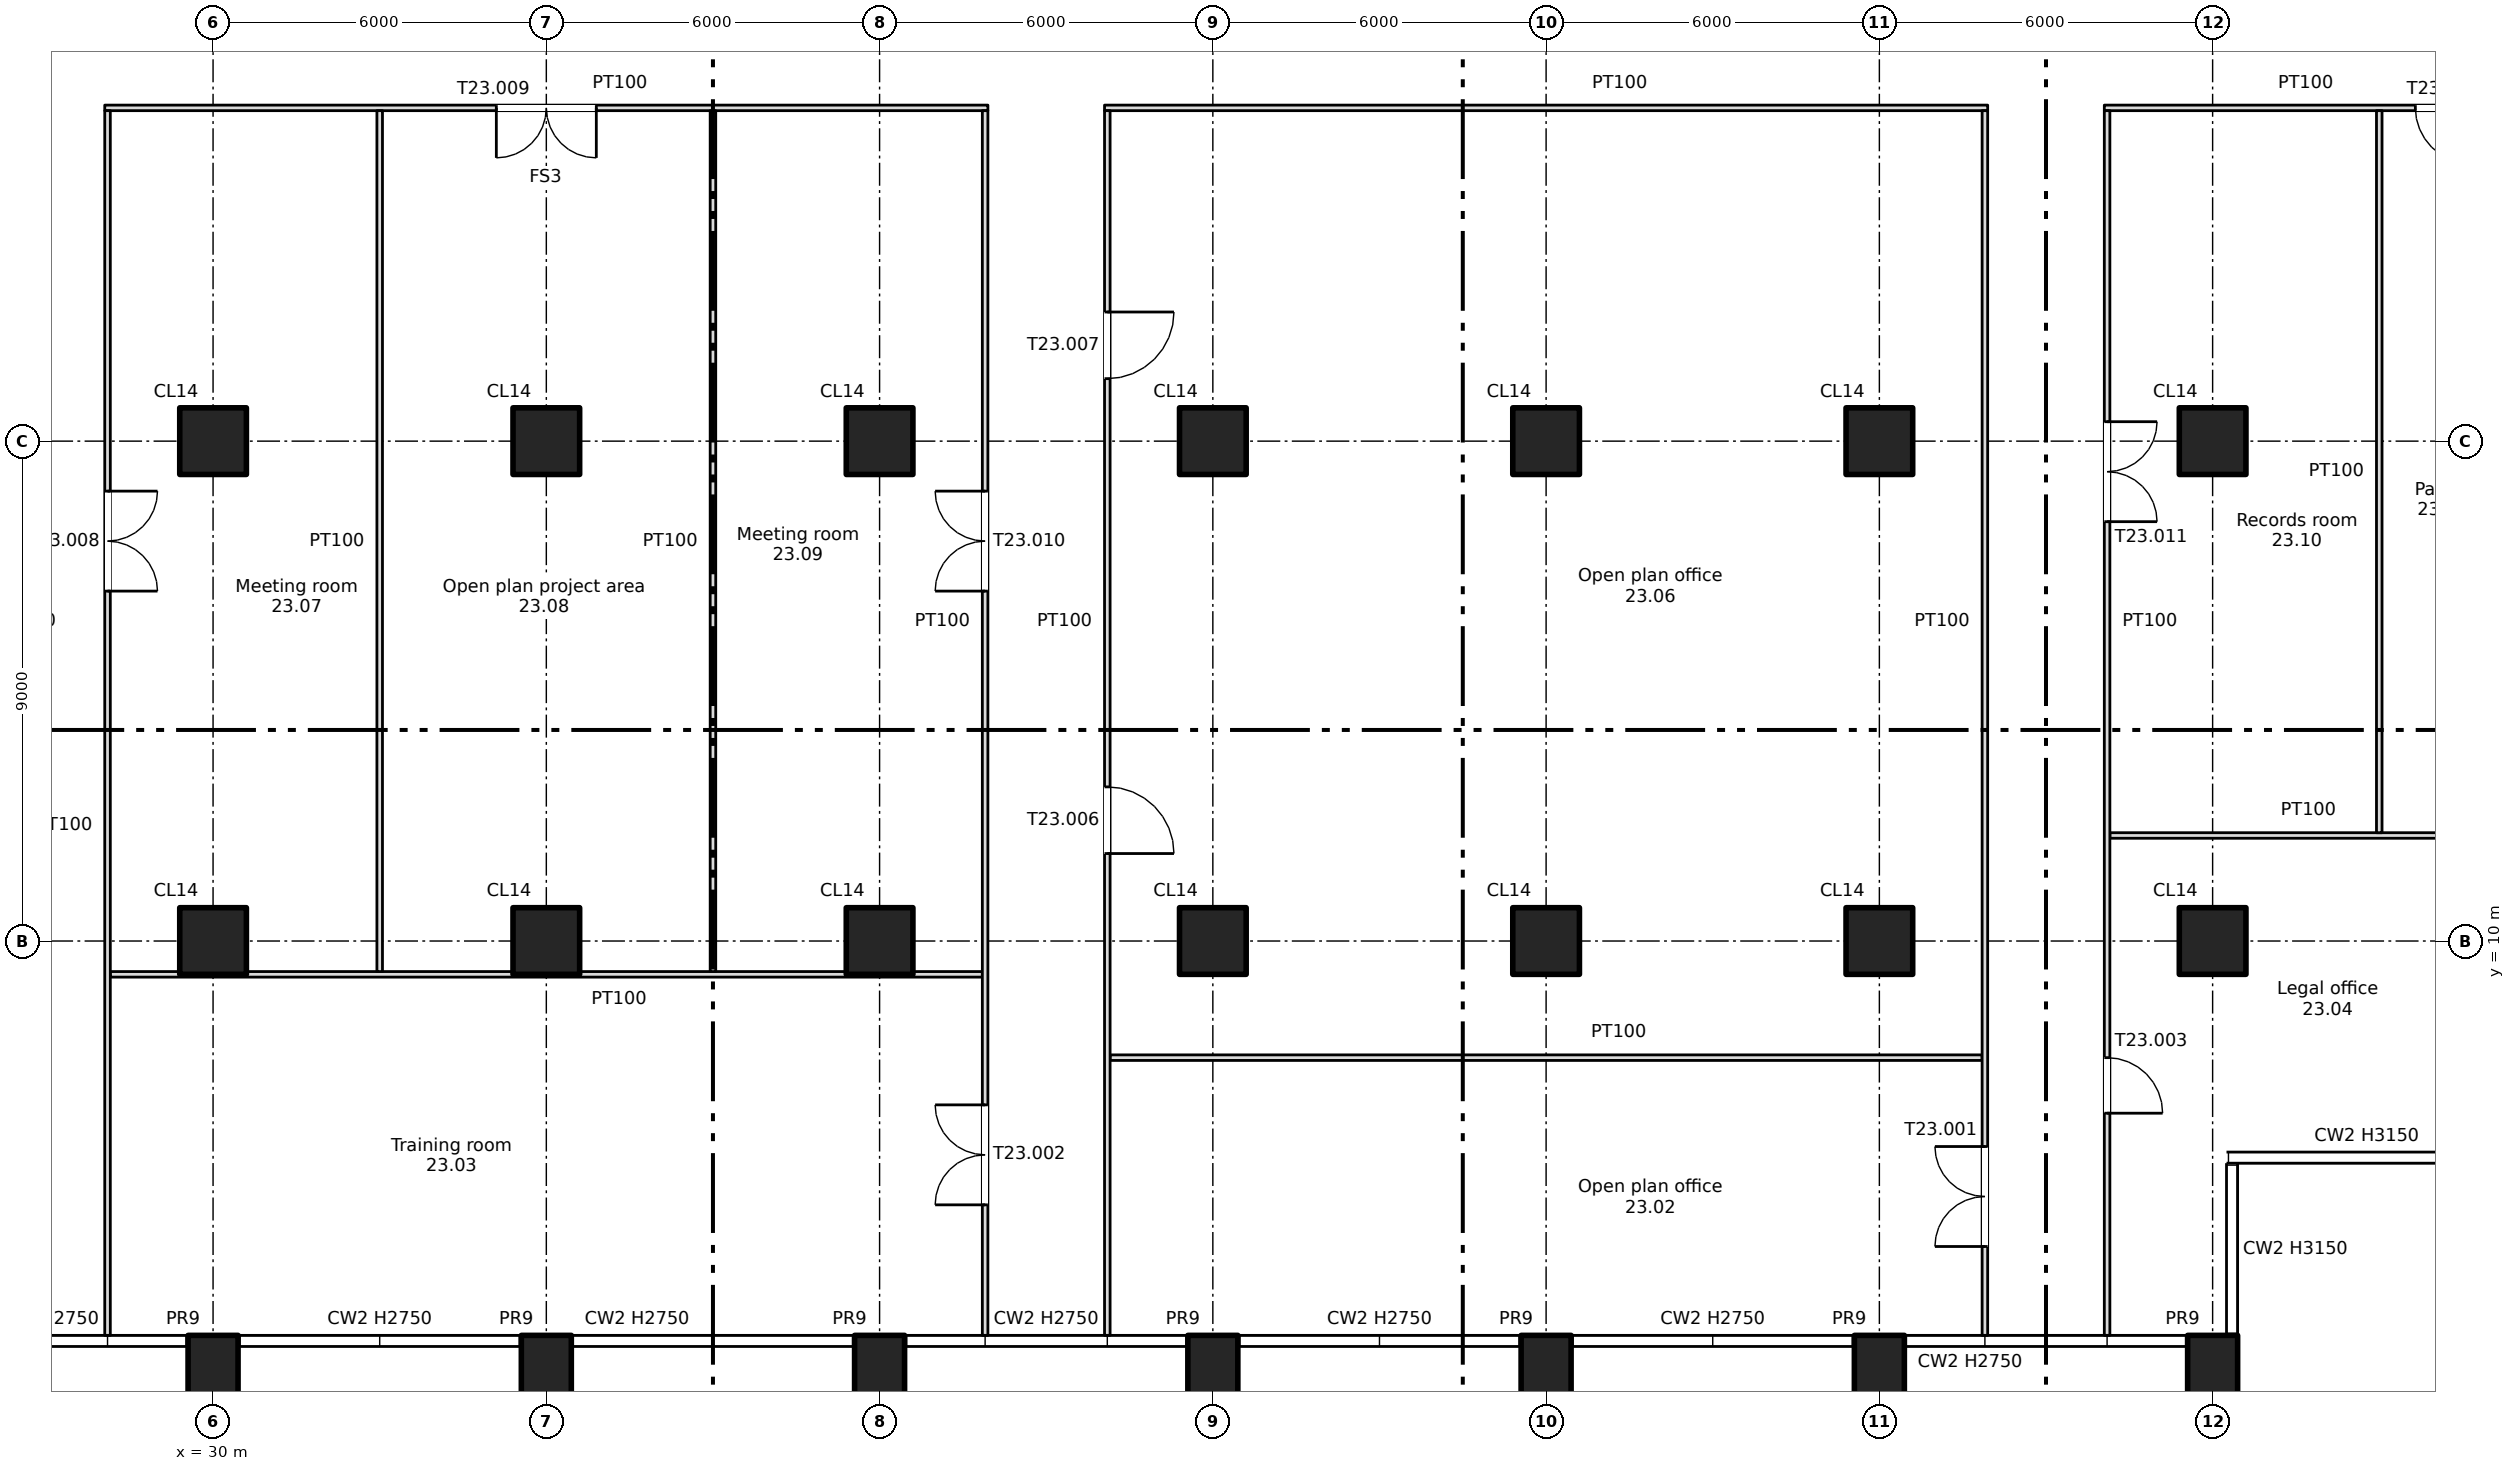
"""IFC4 building model, lengths in metres.
Left out: names, types, materials, properties, quantities, classifications, styles, units other than length and angle.
Written with IfcOpenShell. Run it as: python <this file> out.ifc"""

import sys

from ifc_helpers import new_model, si_unit, direction, frame, frame_2d, origin, origin_2d, place, context, subcontext, project, spatial, rectangle, extrude, element, fill, save


model = new_model("IFC4")
c1 = context("Model", 3, precision=1e-05, world=origin(), true_north=direction((0.0, 1.0)))
c2 = subcontext(c1, "Body", "Model", "MODEL_VIEW")
j1 = project(units=[si_unit("LENGTHUNIT", "METRE"), si_unit("PLANEANGLEUNIT", "RADIAN")], contexts=[c1])
p1 = place(None, origin())
s1 = spatial("IfcSite", under=j1, at=p1, CompositionType="ELEMENT")
p2 = place(p1, origin())
s2 = spatial("IfcBuilding", under=s1, at=p2, CompositionType="ELEMENT")
p3 = place(p2, frame((0.0, 0.0, 155.0)))
s3 = spatial("IfcBuildingStorey", under=s2, at=p3, CompositionType="ELEMENT", Elevation=155.0)
for number, where, z_axis, x_axis in (
    (1, (30.0, 2.2, -0.4), (0.0, 0.0, 1.0), (1.0, 0.0, 0.0)),
    (2, (36.0, 2.2, -0.4), (0.0, 0.0, 1.0), (1.0, 0.0, 0.0)),
    (3, (42.0, 2.2, -0.4), (0.0, 0.0, 1.0), (1.0, 0.0, 0.0)),
    (4, (48.0, 2.2, -0.4), (0.0, 0.0, 1.0), (1.0, 0.0, 0.0)),
    (5, (54.0, 2.2, -0.4), (0.0, 0.0, 1.0), (1.0, 0.0, 0.0)),
    (6, (60.0, 2.2, -0.4), (0.0, 0.0, 1.0), (1.0, 0.0, 0.0)),
    (7, (66.0, 2.2, -0.4), (0.0, 0.0, 1.0), (1.0, 0.0, 0.0)),
):
    element("IfcColumn", number, at=place(p3, frame(where, z_axis=z_axis, x_axis=x_axis)), inside=s3, PredefinedType="COLUMN", context=c2, shape_type="SweptSolid", body=[
        extrude(rectangle(XDim=0.9, YDim=1.4, at=origin_2d()), origin(), (0.0, 0.0, 1.0), 3.55),
    ])
for number, where, z_axis, x_axis in (
    (8, (30.0, 10.0, 0.0), (0.0, 0.0, 1.0), (1.0, 0.0, 0.0)),
    (9, (30.0, 19.0, 0.0), (0.0, 0.0, 1.0), (1.0, 0.0, 0.0)),
    (10, (36.0, 10.0, 0.0), (0.0, 0.0, 1.0), (1.0, 0.0, 0.0)),
    (11, (36.0, 19.0, 0.0), (0.0, 0.0, 1.0), (1.0, 0.0, 0.0)),
    (12, (42.0, 10.0, 0.0), (0.0, 0.0, 1.0), (1.0, 0.0, 0.0)),
    (13, (42.0, 19.0, 0.0), (0.0, 0.0, 1.0), (1.0, 0.0, 0.0)),
    (14, (48.0, 10.0, 0.0), (0.0, 0.0, 1.0), (1.0, 0.0, 0.0)),
    (15, (48.0, 19.0, 0.0), (0.0, 0.0, 1.0), (1.0, 0.0, 0.0)),
    (16, (54.0, 10.0, 0.0), (0.0, 0.0, 1.0), (1.0, 0.0, 0.0)),
    (17, (54.0, 19.0, 0.0), (0.0, 0.0, 1.0), (1.0, 0.0, 0.0)),
    (18, (60.0, 10.0, 0.0), (0.0, 0.0, 1.0), (1.0, 0.0, 0.0)),
    (19, (60.0, 19.0, 0.0), (0.0, 0.0, 1.0), (1.0, 0.0, 0.0)),
    (20, (66.0, 10.0, 0.0), (0.0, 0.0, 1.0), (1.0, 0.0, 0.0)),
    (21, (66.0, 19.0, 0.0), (0.0, 0.0, 1.0), (1.0, 0.0, 0.0)),
):
    element("IfcColumn", number, at=place(p3, frame(where, z_axis=z_axis, x_axis=x_axis)), inside=s3, PredefinedType="COLUMN", context=c2, shape_type="SweptSolid", body=[
        extrude(rectangle(XDim=1.2, YDim=1.2, at=origin_2d()), origin(), (0.0, 0.0, 1.0), 3.15),
    ])
for number, where, z_axis, x_axis in (
    (22, (46.15, 7.9, 0.0), (0.0, 0.0, 1.0), (1.0, 0.0, 0.0)),
    (23, (28.15, 9.4, 0.0), (0.0, 0.0, 1.0), (1.0, 0.0, 0.0)),
):
    element("IfcWall", number, at=place(p3, frame(where, z_axis=z_axis, x_axis=x_axis)), inside=s3, PredefinedType="PARTITIONING", context=c2, shape_type="SweptSolid", body=[
        extrude(rectangle(XDim=15.7, YDim=0.1, at=frame_2d((7.85, 0.0))), origin(), (0.0, 0.0, 1.0), 3.15),
    ])
p4 = place(p3, frame((64.15, 11.9, 0.0), z_axis=(0.0, 0.0, 1.0), x_axis=(1.0, 0.0, 0.0)))
e24 = element("IfcWall", 24, at=p4, inside=s3, PredefinedType="PARTITIONING", context=c2, shape_type="SweptSolid", body=[
    extrude(rectangle(XDim=7.15, YDim=0.1, at=frame_2d((3.575, 0.0))), origin(), (0.0, 0.0, 1.0), 3.15),
])
p5 = place(p3, frame((28.05, 25.0, 0.0), z_axis=(0.0, 0.0, 1.0), x_axis=(1.0, 0.0, 0.0)))
e25 = element("IfcWall", 25, at=p5, inside=s3, PredefinedType="PARTITIONING", context=c2, shape_type="SweptSolid", body=[
    extrude(rectangle(XDim=15.9, YDim=0.1, at=frame_2d((7.95, 0.0))), origin(), (0.0, 0.0, 1.0), 3.15),
])
p6 = place(p5, frame((7.05, 0.0, 0.0)))
e26 = element("IfcOpeningElement", 26, at=p6, cuts=e25, PredefinedType="OPENING", context=c2, shape_type="SweptSolid", body=[
    extrude(rectangle(XDim=1.8, YDim=2.1, at=frame_2d((0.9, 1.05))), frame((0.0, 0.06, 0.0), z_axis=(0.0, -1.0, 0.0), x_axis=(1.0, 0.0, 0.0)), (0.0, 0.0, 1.0), 0.12),
])
p7 = place(p3, frame((46.05, 25.0, 0.0), z_axis=(0.0, 0.0, 1.0), x_axis=(1.0, 0.0, 0.0)))
e27 = element("IfcWall", 27, at=p7, inside=s3, PredefinedType="PARTITIONING", context=c2, shape_type="SweptSolid", body=[
    extrude(rectangle(XDim=15.9, YDim=0.1, at=frame_2d((7.95, 0.0))), origin(), (0.0, 0.0, 1.0), 3.15),
])
p8 = place(p3, frame((64.05, 25.0, 0.0), z_axis=(0.0, 0.0, 1.0), x_axis=(1.0, 0.0, 0.0)))
e28 = element("IfcWall", 28, at=p8, inside=s3, PredefinedType="PARTITIONING", context=c2, shape_type="SweptSolid", body=[
    extrude(rectangle(XDim=7.25, YDim=0.1, at=frame_2d((3.625, 0.0))), origin(), (0.0, 0.0, 1.0), 3.15),
])
p9 = place(p8, frame((5.6, 0.0, 0.0)))
e29 = element("IfcOpeningElement", 29, at=p9, cuts=e28, PredefinedType="OPENING", context=c2, shape_type="SweptSolid", body=[
    extrude(rectangle(XDim=1.0, YDim=2.1, at=frame_2d((0.5, 1.05))), frame((0.0, 0.06, 0.0), z_axis=(0.0, -1.0, 0.0), x_axis=(1.0, 0.0, 0.0)), (0.0, 0.0, 1.0), 0.12),
])
p10 = place(p3, frame((28.1, 2.9, 0.0), z_axis=(0.0, 0.0, 1.0), x_axis=(0.0, 1.0, 0.0)))
e30 = element("IfcWall", 30, at=p10, inside=s3, PredefinedType="PARTITIONING", context=c2, shape_type="SweptSolid", body=[
    extrude(rectangle(XDim=22.05, YDim=0.1, at=frame_2d((11.025, 0.0))), origin(), (0.0, 0.0, 1.0), 3.15),
])
p11 = place(p10, frame((13.4, 0.0, 0.0)))
e31 = element("IfcOpeningElement", 31, at=p11, cuts=e30, PredefinedType="OPENING", context=c2, shape_type="SweptSolid", body=[
    extrude(rectangle(XDim=1.8, YDim=2.1, at=frame_2d((0.9, 1.05))), frame((0.0, 0.06, 0.0), z_axis=(0.0, -1.0, 0.0), x_axis=(1.0, 0.0, 0.0)), (0.0, 0.0, 1.0), 0.12),
])
for number, where, z_axis, x_axis in (
    (32, (33.0, 9.45, 0.0), (0.0, 0.0, 1.0), (0.0, 1.0, 0.0)),
    (33, (39.0, 9.45, 0.0), (0.0, 0.0, 1.0), (0.0, 1.0, 0.0)),
):
    element("IfcWall", number, at=place(p3, frame(where, z_axis=z_axis, x_axis=x_axis)), inside=s3, PredefinedType="PARTITIONING", context=c2, shape_type="SweptSolid", body=[
        extrude(rectangle(XDim=15.5, YDim=0.1, at=frame_2d((7.75, 0.0))), origin(), (0.0, 0.0, 1.0), 3.15),
    ])
p12 = place(p3, frame((43.9, 2.9, 0.0), z_axis=(0.0, 0.0, 1.0), x_axis=(0.0, 1.0, 0.0)))
e34 = element("IfcWall", 34, at=p12, inside=s3, PredefinedType="PARTITIONING", context=c2, shape_type="SweptSolid", body=[
    extrude(rectangle(XDim=22.05, YDim=0.1, at=frame_2d((11.025, 0.0))), origin(), (0.0, 0.0, 1.0), 3.15),
])
p13 = place(p12, frame((2.35, 0.0, 0.0)))
e35 = element("IfcOpeningElement", 35, at=p13, cuts=e34, PredefinedType="OPENING", context=c2, shape_type="SweptSolid", body=[
    extrude(rectangle(XDim=1.8, YDim=2.1, at=frame_2d((0.9, 1.05))), frame((0.0, 0.06, 0.0), z_axis=(0.0, -1.0, 0.0), x_axis=(1.0, 0.0, 0.0)), (0.0, 0.0, 1.0), 0.12),
])
p14 = place(p12, frame((13.4, 0.0, 0.0)))
e36 = element("IfcOpeningElement", 36, at=p14, cuts=e34, PredefinedType="OPENING", context=c2, shape_type="SweptSolid", body=[
    extrude(rectangle(XDim=1.8, YDim=2.1, at=frame_2d((0.9, 1.05))), frame((0.0, 0.06, 0.0), z_axis=(0.0, -1.0, 0.0), x_axis=(1.0, 0.0, 0.0)), (0.0, 0.0, 1.0), 0.12),
])
p15 = place(p3, frame((46.1, 2.9, 0.0), z_axis=(0.0, 0.0, 1.0), x_axis=(0.0, 1.0, 0.0)))
e37 = element("IfcWall", 37, at=p15, inside=s3, PredefinedType="PARTITIONING", context=c2, shape_type="SweptSolid", body=[
    extrude(rectangle(XDim=22.05, YDim=0.1, at=frame_2d((11.025, 0.0))), origin(), (0.0, 0.0, 1.0), 3.15),
])
p16 = place(p15, frame((8.675, 0.0, 0.0)))
e38 = element("IfcOpeningElement", 38, at=p16, cuts=e37, PredefinedType="OPENING", context=c2, shape_type="SweptSolid", body=[
    extrude(rectangle(XDim=1.2, YDim=2.1, at=frame_2d((0.6, 1.05))), frame((0.0, 0.06, 0.0), z_axis=(0.0, -1.0, 0.0), x_axis=(1.0, 0.0, 0.0)), (0.0, 0.0, 1.0), 0.12),
])
p17 = place(p15, frame((17.225, 0.0, 0.0)))
e39 = element("IfcOpeningElement", 39, at=p17, cuts=e37, PredefinedType="OPENING", context=c2, shape_type="SweptSolid", body=[
    extrude(rectangle(XDim=1.2, YDim=2.1, at=frame_2d((0.6, 1.05))), frame((0.0, 0.06, 0.0), z_axis=(0.0, -1.0, 0.0), x_axis=(1.0, 0.0, 0.0)), (0.0, 0.0, 1.0), 0.12),
])
p18 = place(p3, frame((61.9, 2.9, 0.0), z_axis=(0.0, 0.0, 1.0), x_axis=(0.0, 1.0, 0.0)))
e40 = element("IfcWall", 40, at=p18, inside=s3, PredefinedType="PARTITIONING", context=c2, shape_type="SweptSolid", body=[
    extrude(rectangle(XDim=22.05, YDim=0.1, at=frame_2d((11.025, 0.0))), origin(), (0.0, 0.0, 1.0), 3.15),
])
p19 = place(p18, frame((1.6, 0.0, 0.0)))
e41 = element("IfcOpeningElement", 41, at=p19, cuts=e40, PredefinedType="OPENING", context=c2, shape_type="SweptSolid", body=[
    extrude(rectangle(XDim=1.8, YDim=2.1, at=frame_2d((0.9, 1.05))), frame((0.0, 0.06, 0.0), z_axis=(0.0, -1.0, 0.0), x_axis=(1.0, 0.0, 0.0)), (0.0, 0.0, 1.0), 0.12),
])
p20 = place(p3, frame((64.1, 2.9, 0.0), z_axis=(0.0, 0.0, 1.0), x_axis=(0.0, 1.0, 0.0)))
e42 = element("IfcWall", 42, at=p20, inside=s3, PredefinedType="PARTITIONING", context=c2, shape_type="SweptSolid", body=[
    extrude(rectangle(XDim=22.05, YDim=0.1, at=frame_2d((11.025, 0.0))), origin(), (0.0, 0.0, 1.0), 3.15),
])
p21 = place(p20, frame((4.0, 0.0, 0.0)))
e43 = element("IfcOpeningElement", 43, at=p21, cuts=e42, PredefinedType="OPENING", context=c2, shape_type="SweptSolid", body=[
    extrude(rectangle(XDim=1.0, YDim=2.1, at=frame_2d((0.5, 1.05))), frame((0.0, 0.06, 0.0), z_axis=(0.0, -1.0, 0.0), x_axis=(1.0, 0.0, 0.0)), (0.0, 0.0, 1.0), 0.12),
])
p22 = place(p20, frame((14.65, 0.0, 0.0)))
e44 = element("IfcOpeningElement", 44, at=p22, cuts=e42, PredefinedType="OPENING", context=c2, shape_type="SweptSolid", body=[
    extrude(rectangle(XDim=1.8, YDim=2.1, at=frame_2d((0.9, 1.05))), frame((0.0, 0.06, 0.0), z_axis=(0.0, -1.0, 0.0), x_axis=(1.0, 0.0, 0.0)), (0.0, 0.0, 1.0), 0.12),
])
p23 = place(p3, frame((69.0, 11.95, 0.0), z_axis=(0.0, 0.0, 1.0), x_axis=(0.0, 1.0, 0.0)))
e45 = element("IfcWall", 45, at=p23, inside=s3, PredefinedType="PARTITIONING", context=c2, shape_type="SweptSolid", body=[
    extrude(rectangle(XDim=13.0, YDim=0.1, at=frame_2d((6.5, 0.0))), origin(), (0.0, 0.0, 1.0), 3.15),
])
p24 = place(p19, origin())
e46 = element("IfcDoor", 46, at=p24, inside=s3, OperationType="DOUBLE_DOOR_SINGLE_SWING", PredefinedType="DOOR", context=c2, shape_type="SweptSolid", body=[
    extrude(rectangle(XDim=1.8, YDim=2.1, at=frame_2d((0.9, 1.05))), frame((0.0, 0.025, 0.0), z_axis=(0.0, -1.0, 0.0), x_axis=(1.0, 0.0, 0.0)), (0.0, 0.0, 1.0), 0.05),
])
fill(e41, e46)
p25 = place(p13, origin())
e47 = element("IfcDoor", 47, at=p25, inside=s3, OperationType="DOUBLE_DOOR_SINGLE_SWING", PredefinedType="DOOR", context=c2, shape_type="SweptSolid", body=[
    extrude(rectangle(XDim=1.8, YDim=2.1, at=frame_2d((0.9, 1.05))), frame((0.0, 0.025, 0.0), z_axis=(0.0, -1.0, 0.0), x_axis=(1.0, 0.0, 0.0)), (0.0, 0.0, 1.0), 0.05),
])
fill(e35, e47)
p26 = place(p21, origin())
e48 = element("IfcDoor", 48, at=p26, inside=s3, OperationType="SINGLE_SWING_LEFT", PredefinedType="DOOR", context=c2, shape_type="SweptSolid", body=[
    extrude(rectangle(XDim=1.0, YDim=2.1, at=frame_2d((0.5, 1.05))), frame((0.0, 0.025, 0.0), z_axis=(0.0, -1.0, 0.0), x_axis=(1.0, 0.0, 0.0)), (0.0, 0.0, 1.0), 0.05),
])
fill(e43, e48)
p27 = place(p16, origin())
e49 = element("IfcDoor", 49, at=p27, inside=s3, OperationType="SINGLE_SWING_LEFT", PredefinedType="DOOR", context=c2, shape_type="SweptSolid", body=[
    extrude(rectangle(XDim=1.2, YDim=2.1, at=frame_2d((0.6, 1.05))), frame((0.0, 0.025, 0.0), z_axis=(0.0, -1.0, 0.0), x_axis=(1.0, 0.0, 0.0)), (0.0, 0.0, 1.0), 0.05),
])
fill(e38, e49)
p28 = place(p17, origin())
e50 = element("IfcDoor", 50, at=p28, inside=s3, OperationType="SINGLE_SWING_RIGHT", PredefinedType="DOOR", context=c2, shape_type="SweptSolid", body=[
    extrude(rectangle(XDim=1.2, YDim=2.1, at=frame_2d((0.6, 1.05))), frame((0.0, 0.025, 0.0), z_axis=(0.0, -1.0, 0.0), x_axis=(1.0, 0.0, 0.0)), (0.0, 0.0, 1.0), 0.05),
])
fill(e39, e50)
p29 = place(p11, origin())
e51 = element("IfcDoor", 51, at=p29, inside=s3, OperationType="DOUBLE_DOOR_SINGLE_SWING", PredefinedType="DOOR", context=c2, shape_type="SweptSolid", body=[
    extrude(rectangle(XDim=1.8, YDim=2.1, at=frame_2d((0.9, 1.05))), frame((0.0, 0.025, 0.0), z_axis=(0.0, -1.0, 0.0), x_axis=(1.0, 0.0, 0.0)), (0.0, 0.0, 1.0), 0.05),
])
fill(e31, e51)
p30 = place(p6, origin())
e52 = element("IfcDoor", 52, at=p30, inside=s3, OperationType="DOUBLE_DOOR_SINGLE_SWING", PredefinedType="DOOR", context=c2, shape_type="SweptSolid", body=[
    extrude(rectangle(XDim=1.8, YDim=2.1, at=frame_2d((0.9, 1.05))), frame((0.0, 0.025, 0.0), z_axis=(0.0, -1.0, 0.0), x_axis=(1.0, 0.0, 0.0)), (0.0, 0.0, 1.0), 0.05),
])
fill(e26, e52)
p31 = place(p14, origin())
e53 = element("IfcDoor", 53, at=p31, inside=s3, OperationType="DOUBLE_DOOR_SINGLE_SWING", PredefinedType="DOOR", context=c2, shape_type="SweptSolid", body=[
    extrude(rectangle(XDim=1.8, YDim=2.1, at=frame_2d((0.9, 1.05))), frame((0.0, 0.025, 0.0), z_axis=(0.0, -1.0, 0.0), x_axis=(1.0, 0.0, 0.0)), (0.0, 0.0, 1.0), 0.05),
])
fill(e36, e53)
p32 = place(p22, origin())
e54 = element("IfcDoor", 54, at=p32, inside=s3, OperationType="DOUBLE_DOOR_SINGLE_SWING", PredefinedType="DOOR", context=c2, shape_type="SweptSolid", body=[
    extrude(rectangle(XDim=1.8, YDim=2.1, at=frame_2d((0.9, 1.05))), frame((0.0, 0.025, 0.0), z_axis=(0.0, -1.0, 0.0), x_axis=(1.0, 0.0, 0.0)), (0.0, 0.0, 1.0), 0.05),
])
fill(e44, e54)
p33 = place(p9, origin())
e55 = element("IfcDoor", 55, at=p33, inside=s3, OperationType="SINGLE_SWING_RIGHT", PredefinedType="DOOR", context=c2, shape_type="SweptSolid", body=[
    extrude(rectangle(XDim=1.0, YDim=2.1, at=frame_2d((0.5, 1.05))), frame((0.0, 0.025, 0.0), z_axis=(0.0, -1.0, 0.0), x_axis=(1.0, 0.0, 0.0)), (0.0, 0.0, 1.0), 0.05),
])
fill(e29, e55)
save(model, sys.argv[1])
